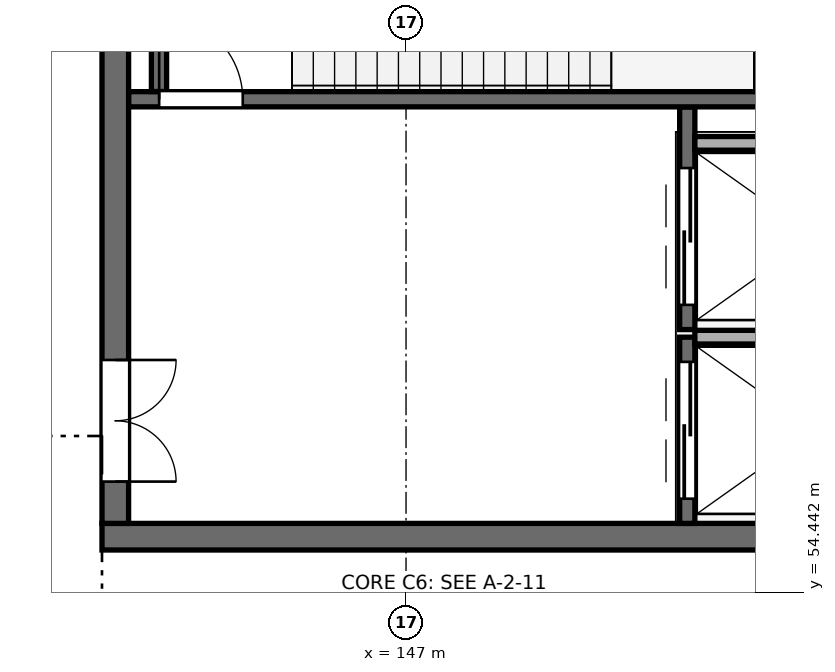
"""IFC4 building model, lengths in metres.
Left out: names, types, materials, properties, quantities, classifications, styles, units other than length and angle.
Written with IfcOpenShell. Run it as: python <this file> out.ifc"""

import sys

from ifc_helpers import new_model, si_unit, direction, frame, frame_2d, origin, place, context, subcontext, project, spatial, rectangle, extrude, element, fill, save


model = new_model("IFC4")
c1 = context("Model", 3, precision=1e-05, world=origin(), true_north=direction((0.0, 1.0)))
c2 = subcontext(c1, "Body", "Model", "MODEL_VIEW")
j1 = project(units=[si_unit("LENGTHUNIT", "METRE"), si_unit("PLANEANGLEUNIT", "RADIAN")], contexts=[c1])
p1 = place(None, origin())
s1 = spatial("IfcSite", under=j1, at=p1, CompositionType="ELEMENT")
p2 = place(p1, origin())
s2 = spatial("IfcBuilding", under=s1, at=p2, CompositionType="ELEMENT")
p3 = place(p2, frame((0.0, 0.0, -5.4)))
s3 = spatial("IfcBuildingStorey", under=s2, at=p3, CompositionType="ELEMENT", Elevation=-5.4)
p4 = place(p3, frame((143.0, 55.175, 0.0), z_axis=(0.0, 0.0, 1.0), x_axis=(1.0, 0.0, 0.0)))
e1 = element("IfcWall", 1, at=p4, inside=s3, PredefinedType="SHEAR", context=c2, shape_type="SweptSolid", body=[
    extrude(rectangle(XDim=11.4, YDim=0.35, at=frame_2d((5.7, 0.0))), origin(), (0.0, 0.0, 1.0), 5.4),
])
p5 = place(p3, frame((143.175, 55.35, 0.0), z_axis=(0.0, 0.0, 1.0), x_axis=(0.0, 1.0, 0.0)))
e2 = element("IfcWall", 2, at=p5, inside=s3, PredefinedType="SHEAR", context=c2, shape_type="SweptSolid", body=[
    extrude(rectangle(XDim=9.3, YDim=0.35, at=frame_2d((4.65, 0.0))), origin(), (0.0, 0.0, 1.0), 5.4),
])
p6 = place(p5, frame((0.55, 0.0, 0.0)))
e3 = element("IfcOpeningElement", 3, at=p6, cuts=e2, PredefinedType="OPENING", context=c2, shape_type="SweptSolid", body=[
    extrude(rectangle(XDim=1.6, YDim=2.2, at=frame_2d((0.8, 1.1))), frame((0.0, 0.185, 0.0), z_axis=(0.0, -1.0, 0.0), x_axis=(1.0, 0.0, 0.0)), (0.0, 0.0, 1.0), 0.37),
])
p7 = place(p3, frame((150.7, 55.35, 0.0), z_axis=(0.0, 0.0, 1.0), x_axis=(0.0, 1.0, 0.0)))
e4 = element("IfcWall", 4, at=p7, inside=s3, PredefinedType="SHEAR", context=c2, shape_type="SweptSolid", body=[
    extrude(rectangle(XDim=2.45, YDim=0.2, at=frame_2d((1.225, 0.0))), origin(), (0.0, 0.0, 1.0), 5.04),
])
p8 = place(p7, frame((0.325, 0.0, 0.0)))
e5 = element("IfcOpeningElement", 5, at=p8, cuts=e4, PredefinedType="OPENING", context=c2, shape_type="SweptSolid", body=[
    extrude(rectangle(XDim=1.8, YDim=2.4, at=frame_2d((0.9, 1.2))), frame((0.0, 0.11, 0.0), z_axis=(0.0, -1.0, 0.0), x_axis=(1.0, 0.0, 0.0)), (0.0, 0.0, 1.0), 0.22),
])
p9 = place(p3, frame((150.8, 57.8, 0.0), z_axis=(0.0, 0.0, 1.0), x_axis=(1.0, 0.0, 0.0)))
e6 = element("IfcWall", 6, at=p9, inside=s3, PredefinedType="PARTITIONING", context=c2, shape_type="SweptSolid", body=[
    extrude(rectangle(XDim=3.15, YDim=0.18, at=frame_2d((1.575, 0.0))), origin(), (0.0, 0.0, 1.0), 5.4),
])
p10 = place(p3, frame((150.7, 57.9, 0.0), z_axis=(0.0, 0.0, 1.0), x_axis=(0.0, 1.0, 0.0)))
e7 = element("IfcWall", 7, at=p10, inside=s3, PredefinedType="SHEAR", context=c2, shape_type="SweptSolid", body=[
    extrude(rectangle(XDim=2.928, YDim=0.2, at=frame_2d((1.464, 0.0))), origin(), (0.0, 0.0, 1.0), 5.04),
])
p11 = place(p10, frame((0.325, 0.0, 0.0)))
e8 = element("IfcOpeningElement", 8, at=p11, cuts=e7, PredefinedType="OPENING", context=c2, shape_type="SweptSolid", body=[
    extrude(rectangle(XDim=1.8, YDim=2.4, at=frame_2d((0.9, 1.2))), frame((0.0, 0.11, 0.0), z_axis=(0.0, -1.0, 0.0), x_axis=(1.0, 0.0, 0.0)), (0.0, 0.0, 1.0), 0.22),
])
p12 = place(p3, frame((150.8, 60.35, 0.0), z_axis=(0.0, 0.0, 1.0), x_axis=(1.0, 0.0, 0.0)))
e9 = element("IfcWall", 9, at=p12, inside=s3, PredefinedType="PARTITIONING", context=c2, shape_type="SweptSolid", body=[
    extrude(rectangle(XDim=3.15, YDim=0.18, at=frame_2d((1.575, 0.0))), origin(), (0.0, 0.0, 1.0), 5.4),
])
p13 = place(p3, frame((143.352, 60.93, 0.0), z_axis=(0.0, 0.0, 1.0), x_axis=(1.0, 0.0, 0.0)))
e10 = element("IfcWall", 10, at=p13, inside=s3, PredefinedType="SHEAR", context=c2, shape_type="SweptSolid", body=[
    extrude(rectangle(XDim=8.348, YDim=0.2, at=frame_2d((4.174, 0.0))), origin(), (0.0, 0.0, 1.0), 5.4),
])
p14 = place(p13, frame((0.4, 0.0, 0.0)))
e11 = element("IfcOpeningElement", 11, at=p14, cuts=e10, PredefinedType="OPENING", context=c2, shape_type="SweptSolid", body=[
    extrude(rectangle(XDim=1.1, YDim=2.15, at=frame_2d((0.55, 1.075))), frame((0.0, 0.11, 0.0), z_axis=(0.0, -1.0, 0.0), x_axis=(1.0, 0.0, 0.0)), (0.0, 0.0, 1.0), 0.22),
])
for number, where, z_axis, x_axis in (
    (12, (143.75, 61.032, 0.0), (0.0, 0.0, 1.0), (0.0, 1.0, 0.0)),
    (13, (151.7, 61.032, 0.0), (0.0, 0.0, 1.0), (0.0, 1.0, 0.0)),
):
    element("IfcWall", number, at=place(p3, frame(where, z_axis=z_axis, x_axis=x_axis)), inside=s3, PredefinedType="SHEAR", context=c2, shape_type="SweptSolid", body=[
        extrude(rectangle(XDim=3.586, YDim=0.2, at=frame_2d((1.793, 0.0))), origin(), (0.0, 0.0, 1.0), 5.4),
    ])
p15 = place(p8, origin())
e14 = element("IfcDoor", 14, at=p15, inside=s3, OperationType="DOUBLE_DOOR_SLIDING", PredefinedType="DOOR", context=c2, shape_type="SweptSolid", body=[
    extrude(rectangle(XDim=1.8, YDim=2.4, at=frame_2d((0.9, 1.2))), frame((0.0, 0.025, 0.0), z_axis=(0.0, -1.0, 0.0), x_axis=(1.0, 0.0, 0.0)), (0.0, 0.0, 1.0), 0.05),
])
fill(e5, e14)
p16 = place(p11, origin())
e15 = element("IfcDoor", 15, at=p16, inside=s3, OperationType="DOUBLE_DOOR_SLIDING", PredefinedType="DOOR", context=c2, shape_type="SweptSolid", body=[
    extrude(rectangle(XDim=1.8, YDim=2.4, at=frame_2d((0.9, 1.2))), frame((0.0, 0.025, 0.0), z_axis=(0.0, -1.0, 0.0), x_axis=(1.0, 0.0, 0.0)), (0.0, 0.0, 1.0), 0.05),
])
fill(e8, e15)
p17 = place(p14, frame((1.1, 0.0, 0.0), z_axis=(0.0, 0.0, 1.0), x_axis=(-1.0, 0.0, 0.0)))
e16 = element("IfcDoor", 16, at=p17, inside=s3, OperationType="SINGLE_SWING_RIGHT", PredefinedType="DOOR", context=c2, shape_type="SweptSolid", body=[
    extrude(rectangle(XDim=1.1, YDim=2.15, at=frame_2d((0.55, 1.075))), frame((0.0, 0.025, 0.0), z_axis=(0.0, -1.0, 0.0), x_axis=(1.0, 0.0, 0.0)), (0.0, 0.0, 1.0), 0.05),
])
fill(e11, e16)
p18 = place(p6, frame((1.6, 0.0, 0.0), z_axis=(0.0, 0.0, 1.0), x_axis=(-1.0, 0.0, 0.0)))
e17 = element("IfcDoor", 17, at=p18, inside=s3, OperationType="DOUBLE_DOOR_SINGLE_SWING", PredefinedType="DOOR", context=c2, shape_type="SweptSolid", body=[
    extrude(rectangle(XDim=1.6, YDim=2.2, at=frame_2d((0.8, 1.1))), frame((0.0, 0.025, 0.0), z_axis=(0.0, -1.0, 0.0), x_axis=(1.0, 0.0, 0.0)), (0.0, 0.0, 1.0), 0.05),
])
fill(e3, e17)
save(model, sys.argv[1])
